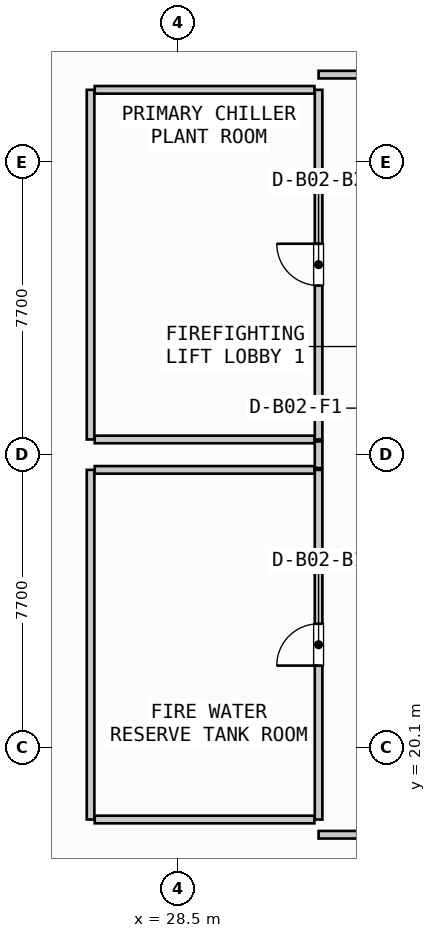
"""IFC4 building model, lengths in metres.
Left out: names, types, materials, properties, quantities, classifications, styles, units other than length and angle.
Written with IfcOpenShell. Run it as: python <this file> out.ifc"""

import sys

from ifc_helpers import new_model, si_unit, direction, frame, frame_2d, origin, place, context, subcontext, project, spatial, rectangle, extrude, source, transform, mapped, element, fill, save


model = new_model("IFC4")
c1 = context("Model", 3, precision=1e-05, world=origin(), true_north=direction((0.0, 1.0)))
c2 = subcontext(c1, "Body", "Model", "MODEL_VIEW")
j1 = project(units=[si_unit("LENGTHUNIT", "METRE"), si_unit("PLANEANGLEUNIT", "RADIAN")], contexts=[c1])
p1 = place(None, origin())
s1 = spatial("IfcSite", under=j1, at=p1, CompositionType="ELEMENT")
p2 = place(p1, origin())
s2 = spatial("IfcBuilding", under=s1, at=p2, CompositionType="ELEMENT")
p3 = place(p2, frame((0.0, 0.0, -9.0)))
s3 = spatial("IfcBuildingStorey", under=s2, at=p3, CompositionType="ELEMENT", Elevation=-9.0)
p4 = place(p3, frame((32.2, 18.2, 0.0), z_axis=(0.0, 0.0, 1.0), x_axis=(0.0, 1.0, 0.0)))
e1 = element("IfcWall", 1, at=p4, inside=s3, PredefinedType="PARTITIONING", context=c2, shape_type="SweptSolid", body=[
    extrude(rectangle(XDim=9.2, YDim=0.2, at=frame_2d((4.6, 0.0))), origin(), (0.0, 0.0, 1.0), 3.433),
])
p5 = place(p4, frame((4.05, 0.0, 0.0)))
e2 = element("IfcOpeningElement", 2, at=p5, cuts=e1, PredefinedType="OPENING", context=c2, shape_type="SweptSolid", body=[
    extrude(rectangle(XDim=1.1, YDim=2.15, at=frame_2d((0.55, 1.075))), frame((0.0, 0.11, 0.0), z_axis=(0.0, -1.0, 0.0), x_axis=(1.0, 0.0, 0.0)), (0.0, 0.0, 1.0), 0.22),
])
p6 = place(p3, frame((26.2, 18.2, 0.0), z_axis=(0.0, 0.0, 1.0), x_axis=(0.0, 1.0, 0.0)))
e3 = element("IfcWall", 3, at=p6, inside=s3, PredefinedType="PARTITIONING", context=c2, shape_type="SweptSolid", body=[
    extrude(rectangle(XDim=9.2, YDim=0.2, at=frame_2d((4.6, 0.0))), origin(), (0.0, 0.0, 1.0), 3.433),
])
for number, where, z_axis, x_axis in (
    (4, (26.31, 18.2, 0.0), (0.0, 0.0, 1.0), (1.0, 0.0, 0.0)),
    (5, (26.31, 27.4, 0.0), (0.0, 0.0, 1.0), (1.0, 0.0, 0.0)),
):
    element("IfcWall", number, at=place(p3, frame(where, z_axis=z_axis, x_axis=x_axis)), inside=s3, PredefinedType="PARTITIONING", context=c2, shape_type="SweptSolid", body=[
        extrude(rectangle(XDim=5.78, YDim=0.2, at=frame_2d((2.89, 0.0))), origin(), (0.0, 0.0, 1.0), 3.433),
    ])
p7 = place(p3, frame((32.2, 28.2, 0.0), z_axis=(0.0, 0.0, 1.0), x_axis=(0.0, 1.0, 0.0)))
e6 = element("IfcWall", 6, at=p7, inside=s3, PredefinedType="PARTITIONING", context=c2, shape_type="SweptSolid", body=[
    extrude(rectangle(XDim=9.2, YDim=0.2, at=frame_2d((4.6, 0.0))), origin(), (0.0, 0.0, 1.0), 3.433),
])
p8 = place(p7, frame((4.05, 0.0, 0.0)))
e7 = element("IfcOpeningElement", 7, at=p8, cuts=e6, PredefinedType="OPENING", context=c2, shape_type="SweptSolid", body=[
    extrude(rectangle(XDim=1.1, YDim=2.15, at=frame_2d((0.55, 1.075))), frame((0.0, 0.11, 0.0), z_axis=(0.0, -1.0, 0.0), x_axis=(1.0, 0.0, 0.0)), (0.0, 0.0, 1.0), 0.22),
])
p9 = place(p3, frame((26.2, 28.2, 0.0), z_axis=(0.0, 0.0, 1.0), x_axis=(0.0, 1.0, 0.0)))
e8 = element("IfcWall", 8, at=p9, inside=s3, PredefinedType="PARTITIONING", context=c2, shape_type="SweptSolid", body=[
    extrude(rectangle(XDim=9.2, YDim=0.2, at=frame_2d((4.6, 0.0))), origin(), (0.0, 0.0, 1.0), 3.433),
])
for number, where, z_axis, x_axis in (
    (9, (26.31, 28.2, 0.0), (0.0, 0.0, 1.0), (1.0, 0.0, 0.0)),
    (10, (26.31, 37.4, 0.0), (0.0, 0.0, 1.0), (1.0, 0.0, 0.0)),
):
    element("IfcWall", number, at=place(p3, frame(where, z_axis=z_axis, x_axis=x_axis)), inside=s3, PredefinedType="PARTITIONING", context=c2, shape_type="SweptSolid", body=[
        extrude(rectangle(XDim=5.78, YDim=0.2, at=frame_2d((2.89, 0.0))), origin(), (0.0, 0.0, 1.0), 3.433),
    ])
p10 = place(p3, frame((32.2, 27.45, 0.0), z_axis=(0.0, 0.0, 1.0), x_axis=(0.0, 1.0, 0.0)))
e11 = element("IfcWall", 11, at=p10, inside=s3, PredefinedType="PARTITIONING", context=c2, shape_type="SweptSolid", body=[
    extrude(rectangle(XDim=0.7, YDim=0.2, at=frame_2d((0.35, 0.0))), origin(), (0.0, 0.0, 1.0), 3.433),
])
p11 = place(p3, frame((32.2, 17.8, 0.0), z_axis=(0.0, 0.0, 1.0), x_axis=(1.0, 0.0, 0.0)))
e12 = element("IfcWall", 12, at=p11, inside=s3, PredefinedType="PARTITIONING", context=c2, shape_type="SweptSolid", body=[
    extrude(rectangle(XDim=29.2, YDim=0.2, at=frame_2d((14.6, 0.0))), origin(), (0.0, 0.0, 1.0), 3.433),
])
p12 = place(p11, frame((13.85, 0.0, 0.0)))
e13 = element("IfcOpeningElement", 13, at=p12, cuts=e12, PredefinedType="OPENING", context=c2, shape_type="SweptSolid", body=[
    extrude(rectangle(XDim=1.5, YDim=2.2, at=frame_2d((0.75, 1.1))), frame((0.0, 0.11, 0.0), z_axis=(0.0, -1.0, 0.0), x_axis=(1.0, 0.0, 0.0)), (0.0, 0.0, 1.0), 0.22),
])
p13 = place(p3, frame((32.2, 37.8, 0.0), z_axis=(0.0, 0.0, 1.0), x_axis=(1.0, 0.0, 0.0)))
e14 = element("IfcWall", 14, at=p13, inside=s3, PredefinedType="PARTITIONING", context=c2, shape_type="SweptSolid", body=[
    extrude(rectangle(XDim=29.2, YDim=0.2, at=frame_2d((14.6, 0.0))), origin(), (0.0, 0.0, 1.0), 3.433),
])
p14 = place(p13, frame((13.85, 0.0, 0.0)))
e15 = element("IfcOpeningElement", 15, at=p14, cuts=e14, PredefinedType="OPENING", context=c2, shape_type="SweptSolid", body=[
    extrude(rectangle(XDim=1.5, YDim=2.2, at=frame_2d((0.75, 1.1))), frame((0.0, 0.11, 0.0), z_axis=(0.0, -1.0, 0.0), x_axis=(1.0, 0.0, 0.0)), (0.0, 0.0, 1.0), 0.22),
])
m1 = source(origin(), c2, "Body", "SweptSolid", [
    extrude(rectangle(XDim=1.1, YDim=2.15, at=frame_2d((0.55, 1.075))), frame((0.0, 0.025, 0.0), z_axis=(0.0, -1.0, 0.0), x_axis=(1.0, 0.0, 0.0)), (0.0, 0.0, 1.0), 0.05),
])
p15 = place(p5, origin())
e16 = element("IfcDoor", 16, at=p15, inside=s3, OperationType="SINGLE_SWING_LEFT", PredefinedType="DOOR", context=c2, shape_type="MappedRepresentation", body=[
    mapped(m1, transform((0.0, 0.0, 0.0), scale=1.0)),
])
fill(e2, e16)
p16 = place(p8, origin())
e17 = element("IfcDoor", 17, at=p16, inside=s3, OperationType="SINGLE_SWING_RIGHT", PredefinedType="DOOR", context=c2, shape_type="MappedRepresentation", body=[
    mapped(m1, transform((0.0, 0.0, 0.0), scale=1.0)),
])
fill(e7, e17)
save(model, sys.argv[1])
